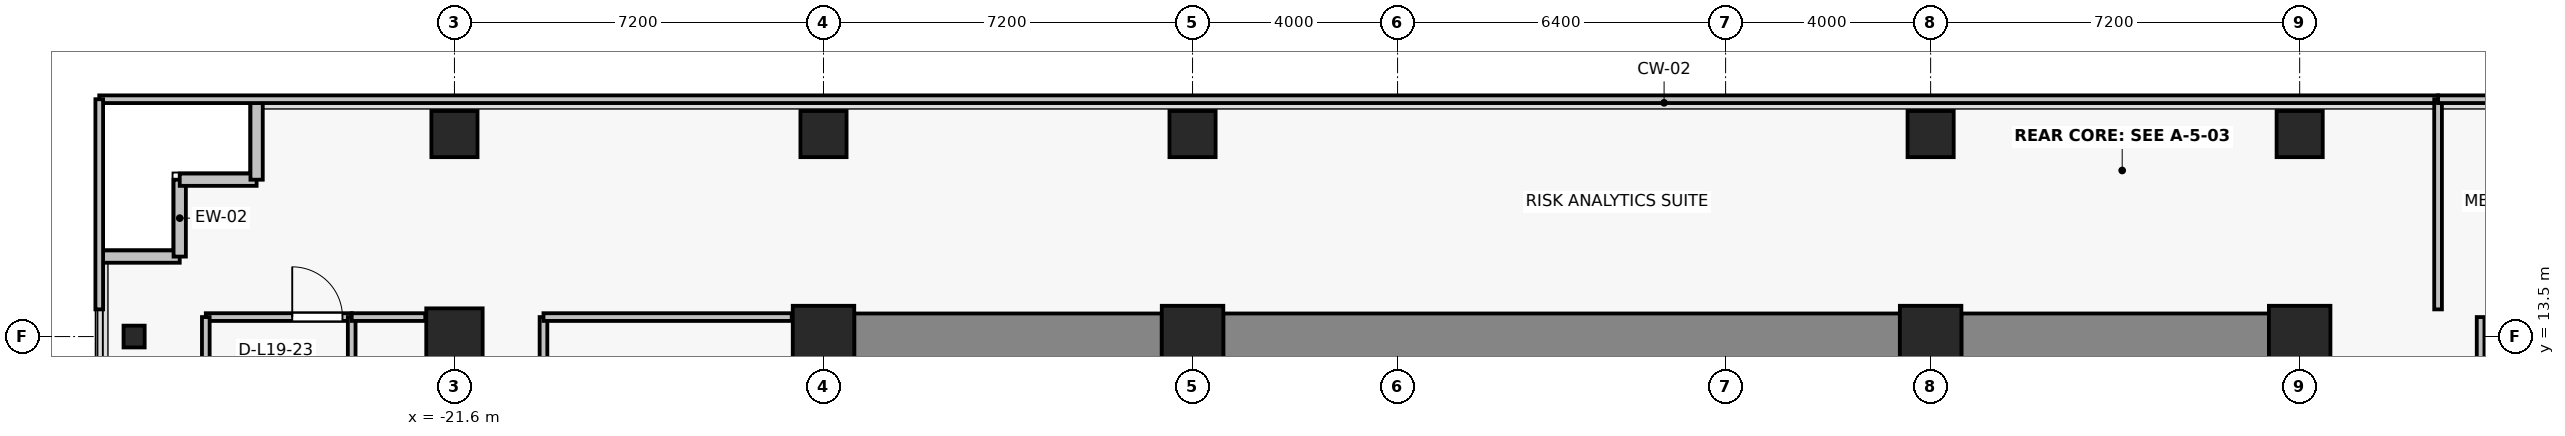
"""IFC4 building model, lengths in metres.
Left out: names, types, materials, properties, quantities, classifications, styles, units other than length and angle.
Written with IfcOpenShell. Run it as: python <this file> out.ifc"""

import sys

from ifc_helpers import new_model, si_unit, direction, frame, frame_2d, origin, origin_2d, place, context, subcontext, project, spatial, rectangle, i_section, extrude, source, transform, mapped, element, fill, save


model = new_model("IFC4")
c1 = context("Model", 3, precision=1e-05, world=origin(), true_north=direction((0.0, 1.0)))
c2 = subcontext(c1, "Body", "Model", "MODEL_VIEW")
j1 = project(units=[si_unit("LENGTHUNIT", "METRE"), si_unit("PLANEANGLEUNIT", "RADIAN")], contexts=[c1])
p1 = place(None, origin())
s1 = spatial("IfcSite", under=j1, at=p1, CompositionType="ELEMENT")
p2 = place(p1, origin())
s2 = spatial("IfcBuilding", under=s1, at=p2, CompositionType="ELEMENT")
p3 = place(p2, frame((0.0, 0.0, 70.3)))
s3 = spatial("IfcBuildingStorey", under=s2, at=p3, CompositionType="ELEMENT", Elevation=70.3)
for number, where, z_axis, x_axis in (
    (1, (-14.4, 13.5, 0.0), (0.0, 0.0, 1.0), (1.0, 0.0, 0.0)),
    (2, (-7.2, 13.5, 0.0), (0.0, 0.0, 1.0), (1.0, 0.0, 0.0)),
    (3, (7.2, 13.5, 0.0), (0.0, 0.0, 1.0), (1.0, 0.0, 0.0)),
    (4, (14.4, 13.5, 0.0), (0.0, 0.0, 1.0), (1.0, 0.0, 0.0)),
):
    element("IfcColumn", number, at=place(p3, frame(where, z_axis=z_axis, x_axis=x_axis)), inside=s3, PredefinedType="COLUMN", context=c2, shape_type="SweptSolid", body=[
        extrude(rectangle(XDim=1.2, YDim=1.2, at=origin_2d()), origin(), (0.0, 0.0, 1.0), 3.3),
    ])
p4 = place(p3, frame((-21.6, 13.5, 0.0), z_axis=(0.0, 0.0, 1.0), x_axis=(1.0, 0.0, 0.0)))
e5 = element("IfcColumn", 5, at=p4, inside=s3, PredefinedType="COLUMN", context=c2, shape_type="SweptSolid", body=[
    extrude(rectangle(XDim=1.1, YDim=1.1, at=origin_2d()), origin(), (0.0, 0.0, 1.0), 3.3),
])
for number, where, z_axis, x_axis in (
    (6, (-14.4, 17.45, 0.0), (0.0, 0.0, 1.0), (1.0, 0.0, 0.0)),
    (7, (-7.2, 17.45, 0.0), (0.0, 0.0, 1.0), (1.0, 0.0, 0.0)),
    (8, (7.2, 17.45, 0.0), (0.0, 0.0, 1.0), (1.0, 0.0, 0.0)),
    (9, (14.4, 17.45, 0.0), (0.0, 0.0, 1.0), (1.0, 0.0, 0.0)),
    (10, (-21.6, 17.45, 0.0), (0.0, 0.0, 1.0), (1.0, 0.0, 0.0)),
):
    element("IfcColumn", number, at=place(p3, frame(where, z_axis=z_axis, x_axis=x_axis)), inside=s3, PredefinedType="COLUMN", context=c2, shape_type="SweptSolid", body=[
        extrude(rectangle(XDim=0.9, YDim=0.9, at=origin_2d()), origin(), (0.0, 0.0, 1.0), 3.3),
    ])
p5 = place(p3, frame((-27.85, 13.5, 0.0), z_axis=(0.0, 0.0, 1.0), x_axis=(1.0, 0.0, 0.0)))
e11 = element("IfcColumn", 11, at=p5, inside=s3, PredefinedType="COLUMN", context=c2, shape_type="SweptSolid", body=[
    extrude(i_section(OverallWidth=0.412, OverallDepth=0.425, WebThickness=0.026, FlangeThickness=0.039, FilletRadius=0.015, at=origin_2d()), origin(), (0.0, 0.0, 1.0), 3.3),
])
p6 = place(p3, frame((-13.8, 13.5, 0.0), z_axis=(0.0, 0.0, 1.0), x_axis=(1.0, 0.0, 0.0)))
e12 = element("IfcWall", 12, at=p6, inside=s3, PredefinedType="SHEAR", context=c2, shape_type="SweptSolid", body=[
    extrude(rectangle(XDim=6.0, YDim=0.9, at=frame_2d((3.0, 0.0))), origin(), (0.0, 0.0, 1.0), 3.075),
])
p7 = place(p3, frame((-6.6, 13.5, 0.0), z_axis=(0.0, 0.0, 1.0), x_axis=(1.0, 0.0, 0.0)))
e13 = element("IfcWall", 13, at=p7, inside=s3, PredefinedType="SHEAR", context=c2, shape_type="SweptSolid", body=[
    extrude(rectangle(XDim=13.2, YDim=0.9, at=frame_2d((6.6, 0.0))), origin(), (0.0, 0.0, 1.0), 3.075),
])
p8 = place(p3, frame((7.8, 13.5, 0.0), z_axis=(0.0, 0.0, 1.0), x_axis=(1.0, 0.0, 0.0)))
e14 = element("IfcWall", 14, at=p8, inside=s3, PredefinedType="SHEAR", context=c2, shape_type="SweptSolid", body=[
    extrude(rectangle(XDim=6.0, YDim=0.9, at=frame_2d((3.0, 0.0))), origin(), (0.0, 0.0, 1.0), 3.075),
])
for number, where, z_axis, x_axis in (
    (15, (-26.96, 15.06, 0.0), (0.0, 0.0, 1.0), (-1.0, 0.0, 0.0)),
    (16, (-26.96, 16.56, 0.0), (0.0, 0.0, 1.0), (0.0, -1.0, 0.0)),
    (17, (-25.46, 16.56, 0.0), (0.0, 0.0, 1.0), (-1.0, 0.0, 0.0)),
    (18, (-25.46, 18.06, 0.0), (0.0, 0.0, 1.0), (0.0, -1.0, 0.0)),
):
    element("IfcWall", number, at=place(p3, frame(where, z_axis=z_axis, x_axis=x_axis)), inside=s3, PredefinedType="SOLIDWALL", context=c2, shape_type="SweptSolid", body=[
        extrude(rectangle(XDim=1.5, YDim=0.24, at=frame_2d((0.75, 0.0))), origin(), (0.0, 0.0, 1.0), 3.075),
    ])
p9 = place(p3, frame((-26.451, 13.88, 0.0), z_axis=(0.0, 0.0, 1.0), x_axis=(1.0, 0.0, 0.0)))
e19 = element("IfcWall", 19, at=p9, inside=s3, PredefinedType="PARTITIONING", context=c2, shape_type="SweptSolid", body=[
    extrude(rectangle(XDim=2.846, YDim=0.15, at=frame_2d((1.423, 0.0))), origin(), (0.0, 0.0, 1.0), 3.075),
])
p10 = place(p9, frame((1.686, 0.0, 0.0)))
e20 = element("IfcOpeningElement", 20, at=p10, cuts=e19, PredefinedType="OPENING", context=c2, shape_type="SweptSolid", body=[
    extrude(rectangle(XDim=0.98, YDim=2.15, at=frame_2d((0.49, 1.075))), frame((0.0, 0.085, 0.0), z_axis=(0.0, -1.0, 0.0), x_axis=(1.0, 0.0, 0.0)), (0.0, 0.0, 1.0), 0.17),
])
for number, where, z_axis, x_axis in (
    (21, (-26.451, -1.77, 0.0), (0.0, 0.0, 1.0), (0.0, 1.0, 0.0)),
    (22, (-23.605, 13.88, 0.0), (0.0, 0.0, 1.0), (0.0, -1.0, 0.0)),
):
    element("IfcWall", number, at=place(p3, frame(where, z_axis=z_axis, x_axis=x_axis)), inside=s3, PredefinedType="PARTITIONING", context=c2, shape_type="SweptSolid", body=[
        extrude(rectangle(XDim=15.65, YDim=0.15, at=frame_2d((7.825, 0.0))), origin(), (0.0, 0.0, 1.0), 2.465),
    ])
p11 = place(p3, frame((-23.605, 13.88, 0.0), z_axis=(0.0, 0.0, 1.0), x_axis=(1.0, 0.0, 0.0)))
e23 = element("IfcWall", 23, at=p11, inside=s3, PredefinedType="PARTITIONING", context=c2, shape_type="SweptSolid", body=[
    extrude(rectangle(XDim=1.435, YDim=0.15, at=frame_2d((0.718, 0.0))), origin(), (0.0, 0.0, 1.0), 3.075),
])
p12 = place(p3, frame((-19.863, 13.88, 0.0), z_axis=(0.0, 0.0, 1.0), x_axis=(0.0, -1.0, 0.0)))
e24 = element("IfcWall", 24, at=p12, inside=s3, PredefinedType="PARTITIONING", context=c2, shape_type="SweptSolid", body=[
    extrude(rectangle(XDim=15.65, YDim=0.15, at=frame_2d((7.825, 0.0))), origin(), (0.0, 0.0, 1.0), 2.465),
])
p13 = place(p3, frame((-19.863, 13.88, 0.0), z_axis=(0.0, 0.0, 1.0), x_axis=(1.0, 0.0, 0.0)))
e25 = element("IfcWall", 25, at=p13, inside=s3, PredefinedType="PARTITIONING", context=c2, shape_type="SweptSolid", body=[
    extrude(rectangle(XDim=4.843, YDim=0.15, at=frame_2d((2.421, 0.0))), origin(), (0.0, 0.0, 1.0), 3.075),
])
p14 = place(p3, frame((17.93, 4.522, 0.0), z_axis=(0.0, 0.0, 1.0), x_axis=(0.0, 1.0, 0.0)))
e26 = element("IfcWall", 26, at=p14, inside=s3, PredefinedType="PARTITIONING", context=c2, shape_type="SweptSolid", body=[
    extrude(rectangle(XDim=9.358, YDim=0.15, at=frame_2d((4.679, 0.0))), origin(), (0.0, 0.0, 1.0), 2.465),
])
p15 = place(p14, frame((4.189, 0.0, 0.0)))
e27 = element("IfcOpeningElement", 27, at=p15, cuts=e26, PredefinedType="OPENING", context=c2, shape_type="SweptSolid", body=[
    extrude(rectangle(XDim=0.98, YDim=2.15, at=frame_2d((0.49, 1.075))), frame((0.0, 0.085, 0.0), z_axis=(0.0, -1.0, 0.0), x_axis=(1.0, 0.0, 0.0)), (0.0, 0.0, 1.0), 0.17),
])
p16 = place(p3, frame((-28.53, 18.13, 0.0), z_axis=(0.0, 0.0, 1.0), x_axis=(1.0, 0.0, 0.0)))
e28 = element("IfcWall", 28, at=p16, inside=s3, PredefinedType="PARTITIONING", context=c2, shape_type="SweptSolid", body=[
    extrude(rectangle(XDim=45.63, YDim=0.15, at=frame_2d((22.815, 0.0))), origin(), (0.0, 0.0, 1.0), 3.075),
])
p17 = place(p3, frame((-28.53, 14.03, 0.0), z_axis=(0.0, 0.0, 1.0), x_axis=(0.0, 1.0, 0.0)))
e29 = element("IfcWall", 29, at=p17, inside=s3, PredefinedType="PARTITIONING", context=c2, shape_type="SweptSolid", body=[
    extrude(rectangle(XDim=4.1, YDim=0.15, at=frame_2d((2.05, 0.0))), origin(), (0.0, 0.0, 1.0), 3.075),
])
p18 = place(p3, frame((17.1, 18.13, 0.0), z_axis=(0.0, 0.0, 1.0), x_axis=(0.0, -1.0, 0.0)))
e30 = element("IfcWall", 30, at=p18, inside=s3, PredefinedType="PARTITIONING", context=c2, shape_type="SweptSolid", body=[
    extrude(rectangle(XDim=4.1, YDim=0.15, at=frame_2d((2.05, 0.0))), origin(), (0.0, 0.0, 1.0), 2.465),
])
p19 = place(p3, frame((17.1, 18.13, 0.0), z_axis=(0.0, 0.0, 1.0), x_axis=(1.0, 0.0, 0.0)))
e31 = element("IfcWall", 31, at=p19, inside=s3, PredefinedType="PARTITIONING", context=c2, shape_type="SweptSolid", body=[
    extrude(rectangle(XDim=15.43, YDim=0.15, at=frame_2d((7.715, 0.0))), origin(), (0.0, 0.0, 1.0), 3.075),
])
m1 = source(origin(), c2, "Body", "SweptSolid", [
    extrude(rectangle(XDim=0.98, YDim=2.15, at=frame_2d((0.49, 1.075))), frame((0.0, 0.025, 0.0), z_axis=(0.0, -1.0, 0.0), x_axis=(1.0, 0.0, 0.0)), (0.0, 0.0, 1.0), 0.05),
])
p20 = place(p10, origin())
e32 = element("IfcDoor", 32, at=p20, inside=s3, OperationType="SINGLE_SWING_LEFT", PredefinedType="DOOR", context=c2, shape_type="MappedRepresentation", body=[
    mapped(m1, transform((0.0, 0.0, 0.0), x_axis=(1.0, 0.0, 0.0), y_axis=(0.0, 1.0, 0.0), z_axis=(0.0, 0.0, 1.0), scale=1.0)),
])
fill(e20, e32)
save(model, sys.argv[1])
